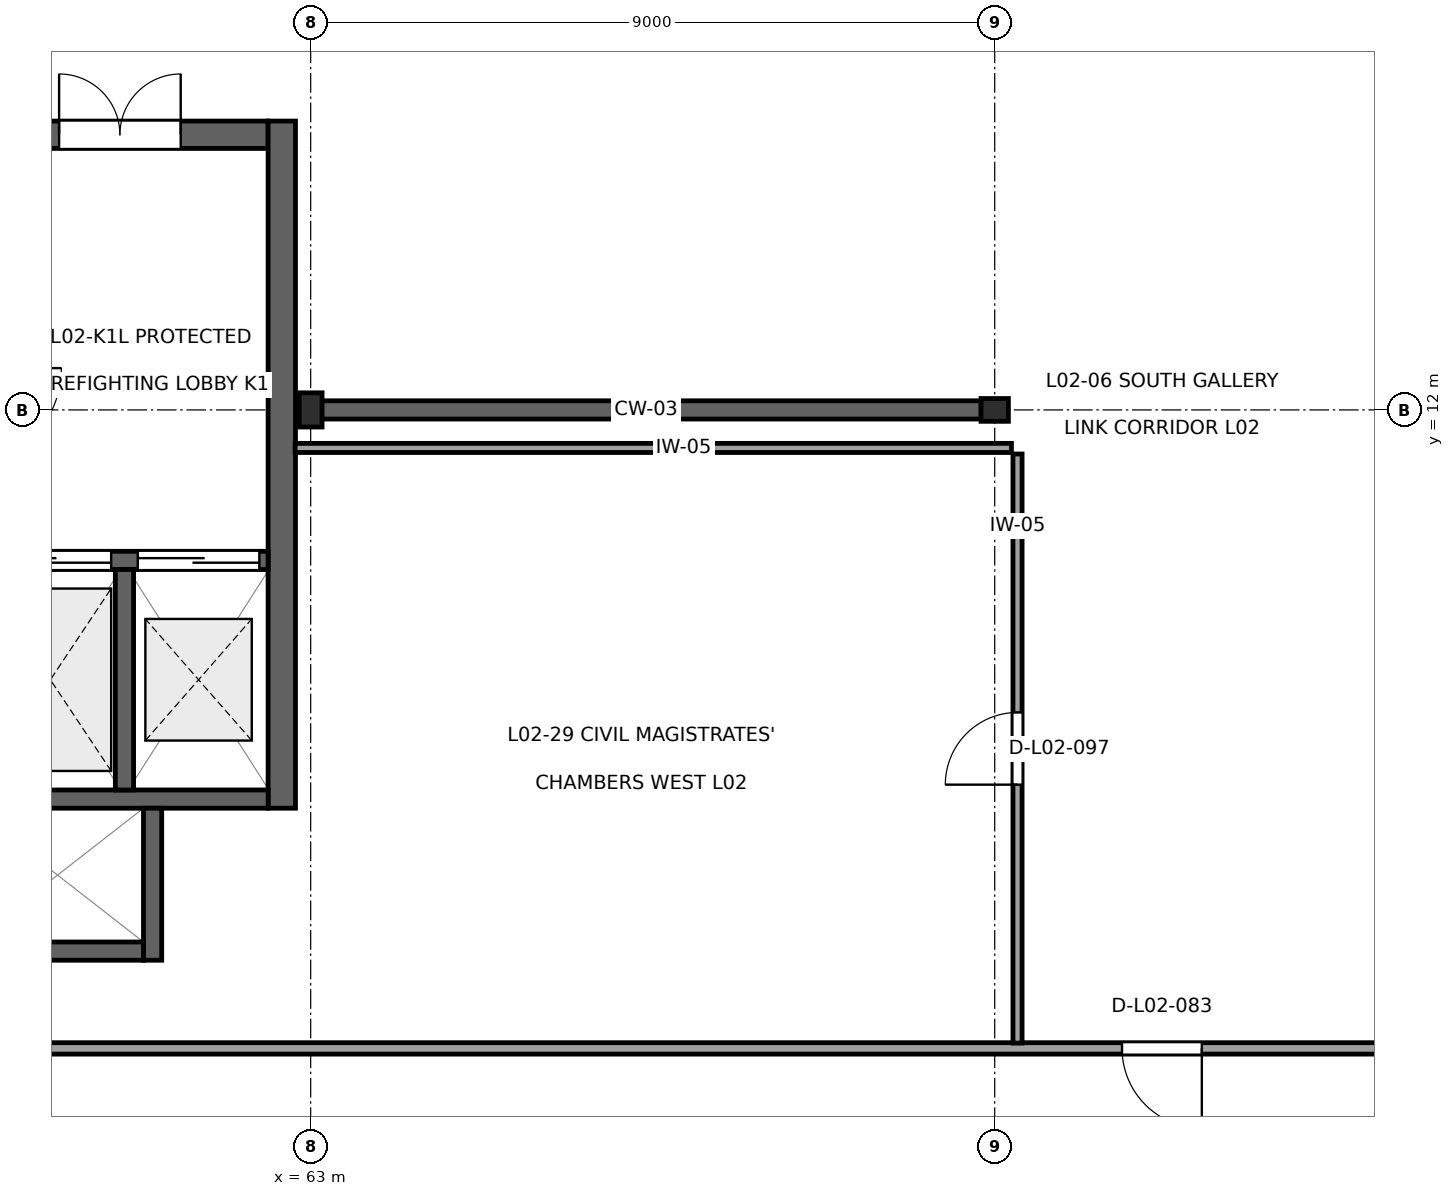
"""IFC4 building model, lengths in metres.
Left out: names, types, materials, properties, quantities, classifications, styles, units other than length and angle.
Written with IfcOpenShell. Run it as: python <this file> out.ifc"""

import sys

from ifc_helpers import new_model, si_unit, direction, frame, frame_2d, origin, origin_2d, place, context, subcontext, project, spatial, rectangle, i_section, extrude, element, fill, save


model = new_model("IFC4")
c1 = context("Model", 3, precision=1e-05, world=origin(), true_north=direction((0.0, 1.0)))
c2 = subcontext(c1, "Body", "Model", "MODEL_VIEW")
j1 = project(units=[si_unit("LENGTHUNIT", "METRE"), si_unit("PLANEANGLEUNIT", "RADIAN")], contexts=[c1])
p1 = place(None, origin())
s1 = spatial("IfcSite", under=j1, at=p1, CompositionType="ELEMENT")
p2 = place(p1, origin())
s2 = spatial("IfcBuilding", under=s1, at=p2, CompositionType="ELEMENT")
p3 = place(p2, frame((0.0, 0.0, 9.9)))
s3 = spatial("IfcBuildingStorey", under=s2, at=p3, CompositionType="ELEMENT", Elevation=9.9)
p4 = place(p3, frame((63.0, 12.0, 0.0), z_axis=(0.0, 0.0, 1.0), x_axis=(1.0, 0.0, 0.0)))
e1 = element("IfcColumn", 1, at=p4, inside=s3, PredefinedType="COLUMN", context=c2, shape_type="SweptSolid", body=[
    extrude(i_section(OverallWidth=0.3, OverallDepth=0.45, WebThickness=0.014, FlangeThickness=0.026, at=origin_2d()), origin(), (0.0, 0.0, 1.0), 4.5),
])
p5 = place(p3, frame((72.0, 12.0, 0.0), z_axis=(0.0, 0.0, 1.0), x_axis=(0.0, 1.0, 0.0)))
e2 = element("IfcColumn", 2, at=p5, inside=s3, PredefinedType="COLUMN", context=c2, shape_type="SweptSolid", body=[
    extrude(i_section(OverallWidth=0.3, OverallDepth=0.36, WebThickness=0.012, FlangeThickness=0.022, at=origin_2d()), origin(), (0.0, 0.0, 1.0), 4.5),
])
p6 = place(p3, frame((58.54, 15.62, 0.0), z_axis=(0.0, 0.0, 1.0), x_axis=(1.0, 0.0, 0.0)))
e3 = element("IfcWall", 3, at=p6, inside=s3, PredefinedType="SHEAR", context=c2, shape_type="SweptSolid", body=[
    extrude(rectangle(XDim=3.9, YDim=0.36, at=frame_2d((1.95, 0.0))), origin(), (0.0, 0.0, 1.0), 4.16),
])
p7 = place(p6, frame((1.15, 0.0, 0.0)))
e4 = element("IfcOpeningElement", 4, at=p7, cuts=e3, PredefinedType="OPENING", context=c2, shape_type="SweptSolid", body=[
    extrude(rectangle(XDim=1.6, YDim=2.25, at=frame_2d((0.8, 1.125))), frame((0.0, 0.195, 0.0), z_axis=(0.0, -1.0, 0.0), x_axis=(1.0, 0.0, 0.0)), (0.0, 0.0, 1.0), 0.39),
])
p8 = place(p3, frame((62.62, 6.76, 0.0), z_axis=(0.0, 0.0, 1.0), x_axis=(0.0, 1.0, 0.0)))
e5 = element("IfcWall", 5, at=p8, inside=s3, PredefinedType="SHEAR", context=c2, shape_type="SweptSolid", body=[
    extrude(rectangle(XDim=9.04, YDim=0.36, at=frame_2d((4.52, 0.0))), origin(), (0.0, 0.0, 1.0), 4.16),
])
p9 = place(p3, frame((58.54, 10.02, 0.0), z_axis=(0.0, 0.0, 1.0), x_axis=(1.0, 0.0, 0.0)))
e6 = element("IfcWall", 6, at=p9, inside=s3, PredefinedType="SHEAR", context=c2, shape_type="SweptSolid", body=[
    extrude(rectangle(XDim=3.9, YDim=0.24, at=frame_2d((1.95, 0.0))), origin(), (0.0, 0.0, 1.0), 4.31),
])
p10 = place(p9, frame((0.235, 0.0, 0.0)))
e7 = element("IfcOpeningElement", 7, at=p10, cuts=e6, PredefinedType="OPENING", context=c2, shape_type="SweptSolid", body=[
    extrude(rectangle(XDim=1.6, YDim=2.3, at=frame_2d((0.8, 1.15))), frame((0.0, 0.135, 0.0), z_axis=(0.0, -1.0, 0.0), x_axis=(1.0, 0.0, 0.0)), (0.0, 0.0, 1.0), 0.27),
])
p11 = place(p9, frame((2.185, 0.0, 0.0)))
e8 = element("IfcOpeningElement", 8, at=p11, cuts=e6, PredefinedType="OPENING", context=c2, shape_type="SweptSolid", body=[
    extrude(rectangle(XDim=1.6, YDim=2.3, at=frame_2d((0.8, 1.15))), frame((0.0, 0.135, 0.0), z_axis=(0.0, -1.0, 0.0), x_axis=(1.0, 0.0, 0.0)), (0.0, 0.0, 1.0), 0.27),
])
p12 = place(p3, frame((58.54, 6.88, 0.0), z_axis=(0.0, 0.0, 1.0), x_axis=(1.0, 0.0, 0.0)))
e9 = element("IfcWall", 9, at=p12, inside=s3, PredefinedType="SHEAR", context=c2, shape_type="SweptSolid", body=[
    extrude(rectangle(XDim=3.9, YDim=0.24, at=frame_2d((1.95, 0.0))), origin(), (0.0, 0.0, 1.0), 4.31),
])
p13 = place(p3, frame((60.55, 7.0, 0.0), z_axis=(0.0, 0.0, 1.0), x_axis=(0.0, 1.0, 0.0)))
e10 = element("IfcWall", 10, at=p13, inside=s3, PredefinedType="SHEAR", context=c2, shape_type="SweptSolid", body=[
    extrude(rectangle(XDim=2.9, YDim=0.24, at=frame_2d((1.45, 0.0))), origin(), (0.0, 0.0, 1.0), 4.31),
])
p14 = place(p3, frame((60.92, 4.76, 0.0), z_axis=(0.0, 0.0, 1.0), x_axis=(0.0, 1.0, 0.0)))
e11 = element("IfcWall", 11, at=p14, inside=s3, PredefinedType="SHEAR", context=c2, shape_type="SweptSolid", body=[
    extrude(rectangle(XDim=2.0, YDim=0.24, at=frame_2d((1.0, 0.0))), origin(), (0.0, 0.0, 1.0), 4.31),
])
p15 = place(p3, frame((58.54, 4.88, 0.0), z_axis=(0.0, 0.0, 1.0), x_axis=(1.0, 0.0, 0.0)))
e12 = element("IfcWall", 12, at=p15, inside=s3, PredefinedType="SHEAR", context=c2, shape_type="SweptSolid", body=[
    extrude(rectangle(XDim=2.26, YDim=0.24, at=frame_2d((1.13, 0.0))), origin(), (0.0, 0.0, 1.0), 4.31),
])
p16 = place(p3, frame((63.008, 12.0, 0.0), z_axis=(0.0, 0.0, 1.0), x_axis=(1.0, 0.0, 0.0)))
e13 = element("IfcWall", 13, at=p16, inside=s3, PredefinedType="SHEAR", context=c2, shape_type="SweptSolid", body=[
    extrude(rectangle(XDim=8.814, YDim=0.24, at=frame_2d((4.407, 0.0))), origin(), (0.0, 0.0, 1.0), 3.675),
])
p17 = place(p3, frame((46.08, 3.6, 0.0), z_axis=(0.0, 0.0, 1.0), x_axis=(1.0, 0.0, 0.0)))
e14 = element("IfcWall", 14, at=p17, inside=s3, PredefinedType="PARTITIONING", context=c2, shape_type="SweptSolid", body=[
    extrude(rectangle(XDim=71.04, YDim=0.15, at=frame_2d((35.52, 0.0))), origin(), (0.0, 0.0, 1.0), 4.14),
])
p18 = place(p17, frame((27.595, 0.0, 0.0)))
e15 = element("IfcOpeningElement", 15, at=p18, cuts=e14, PredefinedType="OPENING", context=c2, shape_type="SweptSolid", body=[
    extrude(rectangle(XDim=1.05, YDim=2.25, at=frame_2d((0.525, 1.125))), frame((0.0, 0.09, 0.0), z_axis=(0.0, -1.0, 0.0), x_axis=(1.0, 0.0, 0.0)), (0.0, 0.0, 1.0), 0.18),
])
p19 = place(p3, frame((62.795, 11.5, 0.0), z_axis=(0.0, 0.0, 1.0), x_axis=(1.0, 0.0, 0.0)))
e16 = element("IfcWall", 16, at=p19, inside=s3, PredefinedType="PARTITIONING", context=c2, shape_type="SweptSolid", body=[
    extrude(rectangle(XDim=9.425, YDim=0.12, at=frame_2d((4.712, 0.0))), origin(), (0.0, 0.0, 1.0), 4.14),
])
p20 = place(p3, frame((72.3, 11.42, 0.0), z_axis=(0.0, 0.0, 1.0), x_axis=(0.0, -1.0, 0.0)))
e17 = element("IfcWall", 17, at=p20, inside=s3, PredefinedType="PARTITIONING", context=c2, shape_type="SweptSolid", body=[
    extrude(rectangle(XDim=7.75, YDim=0.12, at=frame_2d((3.875, 0.0))), origin(), (0.0, 0.0, 1.0), 4.14),
])
p21 = place(p20, frame((3.4, 0.0, 0.0)))
e18 = element("IfcOpeningElement", 18, at=p21, cuts=e17, PredefinedType="OPENING", context=c2, shape_type="SweptSolid", body=[
    extrude(rectangle(XDim=0.95, YDim=2.15, at=frame_2d((0.475, 1.075))), frame((0.0, 0.075, 0.0), z_axis=(0.0, -1.0, 0.0), x_axis=(1.0, 0.0, 0.0)), (0.0, 0.0, 1.0), 0.15),
])
p22 = place(p7, origin())
e19 = element("IfcDoor", 19, at=p22, inside=s3, OperationType="DOUBLE_DOOR_SINGLE_SWING", PredefinedType="DOOR", context=c2, shape_type="SweptSolid", body=[
    extrude(rectangle(XDim=1.6, YDim=2.25, at=frame_2d((0.8, 1.125))), frame((0.0, 0.025, 0.0), z_axis=(0.0, -1.0, 0.0), x_axis=(1.0, 0.0, 0.0)), (0.0, 0.0, 1.0), 0.05),
])
fill(e4, e19)
p23 = place(p10, origin())
e20 = element("IfcDoor", 20, at=p23, inside=s3, OperationType="DOUBLE_DOOR_SLIDING", PredefinedType="DOOR", context=c2, shape_type="SweptSolid", body=[
    extrude(rectangle(XDim=1.6, YDim=2.3, at=frame_2d((0.8, 1.15))), frame((0.0, 0.025, 0.0), z_axis=(0.0, -1.0, 0.0), x_axis=(1.0, 0.0, 0.0)), (0.0, 0.0, 1.0), 0.05),
])
fill(e7, e20)
p24 = place(p11, origin())
e21 = element("IfcDoor", 21, at=p24, inside=s3, OperationType="DOUBLE_DOOR_SLIDING", PredefinedType="DOOR", context=c2, shape_type="SweptSolid", body=[
    extrude(rectangle(XDim=1.6, YDim=2.3, at=frame_2d((0.8, 1.15))), frame((0.0, 0.025, 0.0), z_axis=(0.0, -1.0, 0.0), x_axis=(1.0, 0.0, 0.0)), (0.0, 0.0, 1.0), 0.05),
])
fill(e8, e21)
p25 = place(p18, frame((1.05, 0.0, 0.0), z_axis=(0.0, 0.0, 1.0), x_axis=(-1.0, 0.0, 0.0)))
e22 = element("IfcDoor", 22, at=p25, inside=s3, OperationType="SINGLE_SWING_RIGHT", PredefinedType="DOOR", context=c2, shape_type="SweptSolid", body=[
    extrude(rectangle(XDim=1.05, YDim=2.25, at=frame_2d((0.525, 1.125))), frame((0.0, 0.025, 0.0), z_axis=(0.0, -1.0, 0.0), x_axis=(1.0, 0.0, 0.0)), (0.0, 0.0, 1.0), 0.05),
])
fill(e15, e22)
p26 = place(p21, frame((0.95, 0.0, 0.0), z_axis=(0.0, 0.0, 1.0), x_axis=(-1.0, 0.0, 0.0)))
e23 = element("IfcDoor", 23, at=p26, inside=s3, OperationType="SINGLE_SWING_RIGHT", PredefinedType="DOOR", context=c2, shape_type="SweptSolid", body=[
    extrude(rectangle(XDim=0.95, YDim=2.15, at=frame_2d((0.475, 1.075))), frame((0.0, 0.025, 0.0), z_axis=(0.0, -1.0, 0.0), x_axis=(1.0, 0.0, 0.0)), (0.0, 0.0, 1.0), 0.05),
])
fill(e18, e23)
save(model, sys.argv[1])
